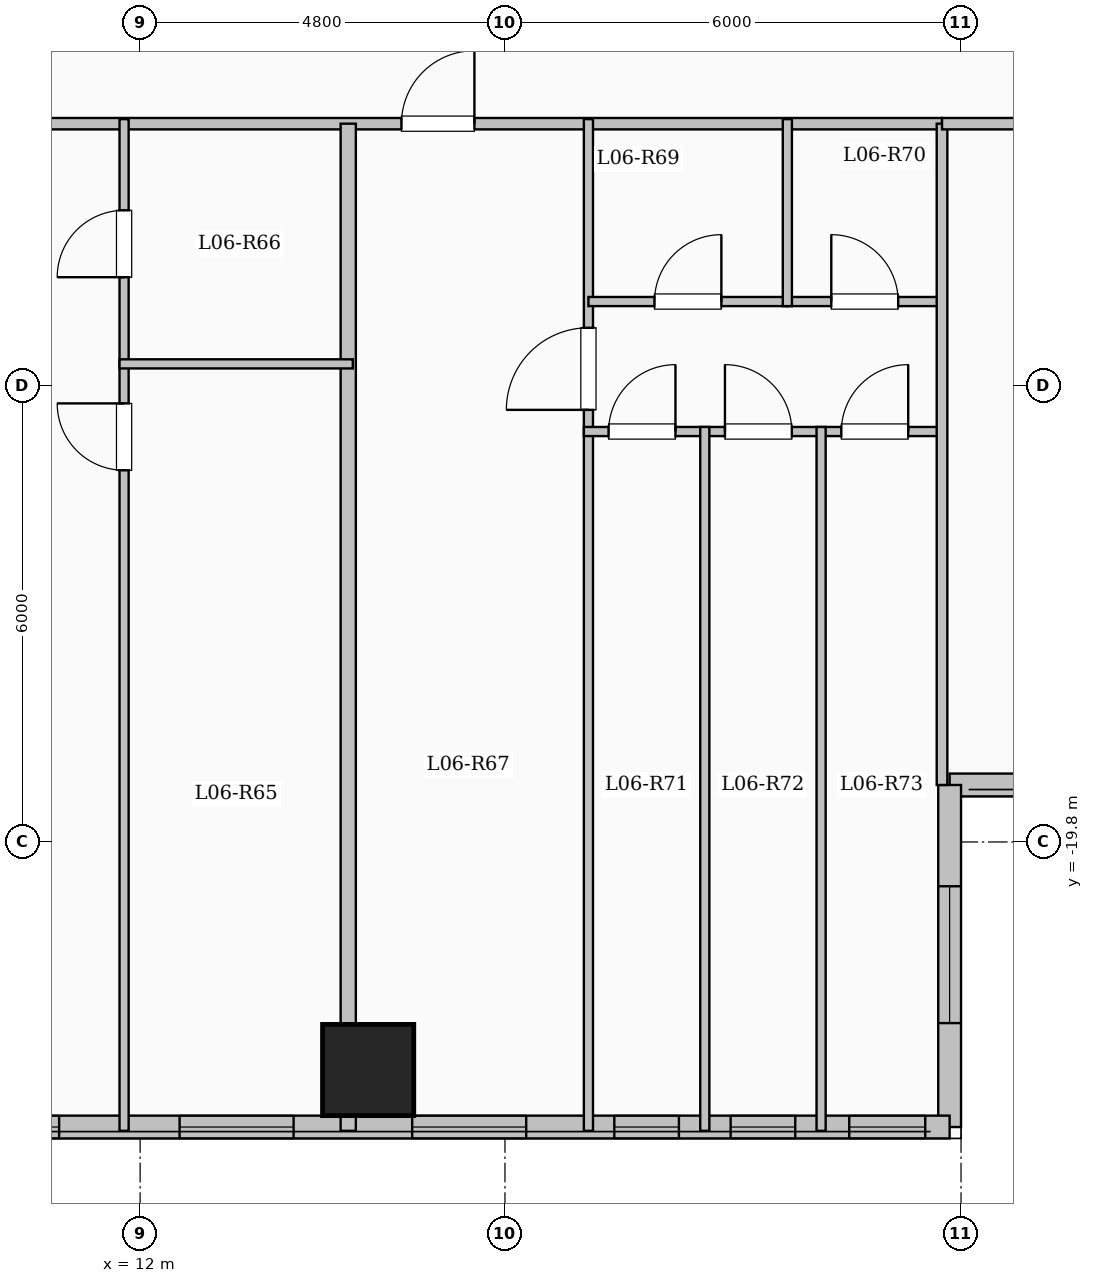
"""IFC4 building model, lengths in metres.
Left out: names, types, materials, properties, quantities, classifications, styles, units other than length and angle.
Written with IfcOpenShell. Run it as: python <this file> out.ifc"""

import sys

from ifc_helpers import new_model, si_unit, direction, frame, frame_2d, origin, origin_2d, place, context, subcontext, project, spatial, rectangle, extrude, element, fill, save


model = new_model("IFC4")
c1 = context("Model", 3, precision=1e-05, world=origin(), true_north=direction((0.0, 1.0)))
c2 = subcontext(c1, "Body", "Model", "MODEL_VIEW")
j1 = project(units=[si_unit("LENGTHUNIT", "METRE"), si_unit("PLANEANGLEUNIT", "RADIAN")], contexts=[c1])
p1 = place(None, origin())
s1 = spatial("IfcSite", under=j1, at=p1, CompositionType="ELEMENT")
p2 = place(p1, origin())
s2 = spatial("IfcBuilding", under=s1, at=p2, CompositionType="ELEMENT")
p3 = place(p2, frame((0.0, 0.0, 27.35)))
s3 = spatial("IfcBuildingStorey", under=s2, at=p3, CompositionType="ELEMENT", Elevation=27.35)
p4 = place(p3, frame((15.0, -22.8, 0.0), z_axis=(0.0, 0.0, 1.0), x_axis=(1.0, 0.0, 0.0)))
e1 = element("IfcColumn", 1, at=p4, inside=s3, PredefinedType="COLUMN", context=c2, shape_type="SweptSolid", body=[
    extrude(rectangle(XDim=1.2, YDim=1.2, at=origin_2d()), origin(), (0.0, 0.0, 1.0), 3.35),
])
p5 = place(p3, frame((28.65, -19.05, 0.0), z_axis=(0.0, 0.0, 1.0), x_axis=(-1.0, 0.0, 0.0)))
e2 = element("IfcWall", 2, at=p5, inside=s3, PredefinedType="SOLIDWALL", context=c2, shape_type="SweptSolid", body=[
    extrude(rectangle(XDim=6.0, YDim=0.3, at=frame_2d((3.0, 0.0))), origin(), (0.0, 0.0, 1.0), 3.1),
])
p6 = place(p5, frame((1.825, 0.0, 0.9)))
e3 = element("IfcOpeningElement", 3, at=p6, cuts=e2, PredefinedType="OPENING", context=c2, shape_type="SweptSolid", body=[
    extrude(rectangle(XDim=2.4, YDim=1.8, at=frame_2d((1.2, 0.9))), frame((0.0, 0.16, 0.0), z_axis=(0.0, -1.0, 0.0), x_axis=(1.0, 0.0, 0.0)), (0.0, 0.0, 1.0), 0.32),
])
p7 = place(p3, frame((22.65, -19.05, 0.0), z_axis=(0.0, 0.0, 1.0), x_axis=(0.0, -1.0, 0.0)))
e4 = element("IfcWall", 4, at=p7, inside=s3, PredefinedType="SOLIDWALL", context=c2, shape_type="SweptSolid", body=[
    extrude(rectangle(XDim=4.5, YDim=0.3, at=frame_2d((2.25, 0.0))), origin(), (0.0, 0.0, 1.0), 3.1),
])
p8 = place(p7, frame((1.333, 0.0, 0.9)))
e5 = element("IfcOpeningElement", 5, at=p8, cuts=e4, PredefinedType="OPENING", context=c2, shape_type="SweptSolid", body=[
    extrude(rectangle(XDim=1.8, YDim=1.65, at=frame_2d((0.9, 0.825))), frame((0.0, 0.16, 0.0), z_axis=(0.0, -1.0, 0.0), x_axis=(1.0, 0.0, 0.0)), (0.0, 0.0, 1.0), 0.32),
])
p9 = place(p3, frame((22.65, -23.55, 0.0), z_axis=(0.0, 0.0, 1.0), x_axis=(-1.0, 0.0, 0.0)))
e6 = element("IfcWall", 6, at=p9, inside=s3, PredefinedType="SOLIDWALL", context=c2, shape_type="SweptSolid", body=[
    extrude(rectangle(XDim=15.3, YDim=0.3, at=frame_2d((7.65, 0.0))), origin(), (0.0, 0.0, 1.0), 3.1),
])
p10 = place(p9, frame((0.321, 0.0, 0.95)))
e7 = element("IfcOpeningElement", 7, at=p10, cuts=e6, PredefinedType="OPENING", context=c2, shape_type="SweptSolid", body=[
    extrude(rectangle(XDim=1.0, YDim=1.5, at=frame_2d((0.5, 0.75))), frame((0.0, 0.16, 0.0), z_axis=(0.0, -1.0, 0.0), x_axis=(1.0, 0.0, 0.0)), (0.0, 0.0, 1.0), 0.32),
])
p11 = place(p9, frame((2.031, 0.0, 0.95)))
e8 = element("IfcOpeningElement", 8, at=p11, cuts=e6, PredefinedType="OPENING", context=c2, shape_type="SweptSolid", body=[
    extrude(rectangle(XDim=0.85, YDim=1.5, at=frame_2d((0.425, 0.75))), frame((0.0, 0.16, 0.0), z_axis=(0.0, -1.0, 0.0), x_axis=(1.0, 0.0, 0.0)), (0.0, 0.0, 1.0), 0.32),
])
p12 = place(p9, frame((3.562, 0.0, 0.95)))
e9 = element("IfcOpeningElement", 9, at=p12, cuts=e6, PredefinedType="OPENING", context=c2, shape_type="SweptSolid", body=[
    extrude(rectangle(XDim=0.85, YDim=1.5, at=frame_2d((0.425, 0.75))), frame((0.0, 0.16, 0.0), z_axis=(0.0, -1.0, 0.0), x_axis=(1.0, 0.0, 0.0)), (0.0, 0.0, 1.0), 0.32),
])
p13 = place(p9, frame((5.571, 0.0, 0.9)))
e10 = element("IfcOpeningElement", 10, at=p13, cuts=e6, PredefinedType="OPENING", context=c2, shape_type="SweptSolid", body=[
    extrude(rectangle(XDim=1.5, YDim=1.65, at=frame_2d((0.75, 0.825))), frame((0.0, 0.16, 0.0), z_axis=(0.0, -1.0, 0.0), x_axis=(1.0, 0.0, 0.0)), (0.0, 0.0, 1.0), 0.32),
])
p14 = place(p9, frame((8.631, 0.0, 0.9)))
e11 = element("IfcOpeningElement", 11, at=p14, cuts=e6, PredefinedType="OPENING", context=c2, shape_type="SweptSolid", body=[
    extrude(rectangle(XDim=1.5, YDim=1.65, at=frame_2d((0.75, 0.825))), frame((0.0, 0.16, 0.0), z_axis=(0.0, -1.0, 0.0), x_axis=(1.0, 0.0, 0.0)), (0.0, 0.0, 1.0), 0.32),
])
p15 = place(p9, frame((11.716, 0.0, 0.9)))
e12 = element("IfcOpeningElement", 12, at=p15, cuts=e6, PredefinedType="OPENING", context=c2, shape_type="SweptSolid", body=[
    extrude(rectangle(XDim=1.5, YDim=1.65, at=frame_2d((0.75, 0.825))), frame((0.0, 0.16, 0.0), z_axis=(0.0, -1.0, 0.0), x_axis=(1.0, 0.0, 0.0)), (0.0, 0.0, 1.0), 0.32),
])
p16 = place(p9, frame((14.303, 0.0, 0.95)))
e13 = element("IfcOpeningElement", 13, at=p16, cuts=e6, PredefinedType="OPENING", context=c2, shape_type="SweptSolid", body=[
    extrude(rectangle(XDim=0.85, YDim=1.5, at=frame_2d((0.425, 0.75))), frame((0.0, 0.16, 0.0), z_axis=(0.0, -1.0, 0.0), x_axis=(1.0, 0.0, 0.0)), (0.0, 0.0, 1.0), 0.32),
])
p17 = place(p3, frame((8.55, -10.35, 0.0), z_axis=(0.0, 0.0, 1.0), x_axis=(1.0, 0.0, 0.0)))
e14 = element("IfcWall", 14, at=p17, inside=s3, PredefinedType="PARTITIONING", context=c2, shape_type="SweptSolid", body=[
    extrude(rectangle(XDim=14.0, YDim=0.15, at=frame_2d((7.0, 0.0))), origin(), (0.0, 0.0, 1.0), 3.1),
])
p18 = place(p17, frame((0.75, 0.0, 0.0)))
e15 = element("IfcOpeningElement", 15, at=p18, cuts=e14, PredefinedType="OPENING", context=c2, shape_type="SweptSolid", body=[
    extrude(rectangle(XDim=0.96, YDim=2.15, at=frame_2d((0.48, 1.075))), frame((0.0, 0.085, 0.0), z_axis=(0.0, -1.0, 0.0), x_axis=(1.0, 0.0, 0.0)), (0.0, 0.0, 1.0), 0.17),
])
p19 = place(p17, frame((6.888, 0.0, 0.0)))
e16 = element("IfcOpeningElement", 16, at=p19, cuts=e14, PredefinedType="OPENING", context=c2, shape_type="SweptSolid", body=[
    extrude(rectangle(XDim=0.96, YDim=2.15, at=frame_2d((0.48, 1.075))), frame((0.0, 0.085, 0.0), z_axis=(0.0, -1.0, 0.0), x_axis=(1.0, 0.0, 0.0)), (0.0, 0.0, 1.0), 0.17),
])
p20 = place(p3, frame((14.738, -23.6, 0.0), z_axis=(0.0, 0.0, 1.0), x_axis=(0.0, 1.0, 0.0)))
e17 = element("IfcWall", 17, at=p20, inside=s3, PredefinedType="SOLIDWALL", context=c2, shape_type="SweptSolid", body=[
    extrude(rectangle(XDim=13.25, YDim=0.2, at=frame_2d((6.625, 0.0))), origin(), (0.0, 0.0, 1.0), 2.435),
])
p21 = place(p3, frame((11.789, -23.6, 0.0), z_axis=(0.0, 0.0, 1.0), x_axis=(0.0, 1.0, 0.0)))
e18 = element("IfcWall", 18, at=p21, inside=s3, PredefinedType="PARTITIONING", context=c2, shape_type="SweptSolid", body=[
    extrude(rectangle(XDim=10.09, YDim=0.12, at=frame_2d((5.045, 0.0))), origin(), (0.0, 0.0, 1.0), 3.1),
])
p22 = place(p21, frame((8.69, 0.0, 0.0)))
e19 = element("IfcOpeningElement", 19, at=p22, cuts=e18, PredefinedType="OPENING", context=c2, shape_type="SweptSolid", body=[
    extrude(rectangle(XDim=0.88, YDim=2.1, at=frame_2d((0.44, 1.05))), frame((0.0, 0.07, 0.0), z_axis=(0.0, -1.0, 0.0), x_axis=(1.0, 0.0, 0.0)), (0.0, 0.0, 1.0), 0.14),
])
p23 = place(p3, frame((11.789, -13.51, 0.0), z_axis=(0.0, 0.0, 1.0), x_axis=(0.0, 1.0, 0.0)))
e20 = element("IfcWall", 20, at=p23, inside=s3, PredefinedType="PARTITIONING", context=c2, shape_type="SweptSolid", body=[
    extrude(rectangle(XDim=3.22, YDim=0.12, at=frame_2d((1.61, 0.0))), origin(), (0.0, 0.0, 1.0), 3.1),
])
p24 = place(p23, frame((1.14, 0.0, 0.0)))
e21 = element("IfcOpeningElement", 21, at=p24, cuts=e20, PredefinedType="OPENING", context=c2, shape_type="SweptSolid", body=[
    extrude(rectangle(XDim=0.88, YDim=2.1, at=frame_2d((0.44, 1.05))), frame((0.0, 0.07, 0.0), z_axis=(0.0, -1.0, 0.0), x_axis=(1.0, 0.0, 0.0)), (0.0, 0.0, 1.0), 0.14),
])
p25 = place(p3, frame((11.729, -13.51, 0.0), z_axis=(0.0, 0.0, 1.0), x_axis=(1.0, 0.0, 0.0)))
e22 = element("IfcWall", 22, at=p25, inside=s3, PredefinedType="PARTITIONING", context=c2, shape_type="SweptSolid", body=[
    extrude(rectangle(XDim=3.069, YDim=0.12, at=frame_2d((1.535, 0.0))), origin(), (0.0, 0.0, 1.0), 3.1),
])
p26 = place(p3, frame((17.898, -23.6, 0.0), z_axis=(0.0, 0.0, 1.0), x_axis=(0.0, 1.0, 0.0)))
e23 = element("IfcWall", 23, at=p26, inside=s3, PredefinedType="PARTITIONING", context=c2, shape_type="SweptSolid", body=[
    extrude(rectangle(XDim=13.31, YDim=0.12, at=frame_2d((6.655, 0.0))), origin(), (0.0, 0.0, 1.0), 3.1),
])
p27 = place(p26, frame((9.485, 0.0, 0.0)))
e24 = element("IfcOpeningElement", 24, at=p27, cuts=e23, PredefinedType="OPENING", context=c2, shape_type="SweptSolid", body=[
    extrude(rectangle(XDim=1.08, YDim=2.15, at=frame_2d((0.54, 1.075))), frame((0.0, 0.07, 0.0), z_axis=(0.0, -1.0, 0.0), x_axis=(1.0, 0.0, 0.0)), (0.0, 0.0, 1.0), 0.14),
])
p28 = place(p3, frame((17.898, -12.69, 0.0), z_axis=(0.0, 0.0, 1.0), x_axis=(1.0, 0.0, 0.0)))
e25 = element("IfcWall", 25, at=p28, inside=s3, PredefinedType="PARTITIONING", context=c2, shape_type="SweptSolid", body=[
    extrude(rectangle(XDim=2.617, YDim=0.12, at=frame_2d((1.309, 0.0))), origin(), (0.0, 0.0, 1.0), 3.1),
])
p29 = place(p28, frame((0.869, 0.0, 0.0)))
e26 = element("IfcOpeningElement", 26, at=p29, cuts=e25, PredefinedType="OPENING", context=c2, shape_type="SweptSolid", body=[
    extrude(rectangle(XDim=0.88, YDim=2.1, at=frame_2d((0.44, 1.05))), frame((0.0, 0.07, 0.0), z_axis=(0.0, -1.0, 0.0), x_axis=(1.0, 0.0, 0.0)), (0.0, 0.0, 1.0), 0.14),
])
p30 = place(p3, frame((20.515, -12.69, 0.0), z_axis=(0.0, 0.0, 1.0), x_axis=(1.0, 0.0, 0.0)))
e27 = element("IfcWall", 27, at=p30, inside=s3, PredefinedType="PARTITIONING", context=c2, shape_type="SweptSolid", body=[
    extrude(rectangle(XDim=2.035, YDim=0.12, at=frame_2d((1.018, 0.0))), origin(), (0.0, 0.0, 1.0), 3.1),
])
p31 = place(p30, frame((0.578, 0.0, 0.0)))
e28 = element("IfcOpeningElement", 28, at=p31, cuts=e27, PredefinedType="OPENING", context=c2, shape_type="SweptSolid", body=[
    extrude(rectangle(XDim=0.88, YDim=2.1, at=frame_2d((0.44, 1.05))), frame((0.0, 0.07, 0.0), z_axis=(0.0, -1.0, 0.0), x_axis=(1.0, 0.0, 0.0)), (0.0, 0.0, 1.0), 0.14),
])
p32 = place(p3, frame((17.838, -14.4, 0.0), z_axis=(0.0, 0.0, 1.0), x_axis=(1.0, 0.0, 0.0)))
e29 = element("IfcWall", 29, at=p32, inside=s3, PredefinedType="PARTITIONING", context=c2, shape_type="SweptSolid", body=[
    extrude(rectangle(XDim=4.772, YDim=0.12, at=frame_2d((2.386, 0.0))), origin(), (0.0, 0.0, 1.0), 3.1),
])
p33 = place(p32, frame((0.325, 0.0, 0.0)))
e30 = element("IfcOpeningElement", 30, at=p33, cuts=e29, PredefinedType="OPENING", context=c2, shape_type="SweptSolid", body=[
    extrude(rectangle(XDim=0.88, YDim=2.1, at=frame_2d((0.44, 1.05))), frame((0.0, 0.07, 0.0), z_axis=(0.0, -1.0, 0.0), x_axis=(1.0, 0.0, 0.0)), (0.0, 0.0, 1.0), 0.14),
])
p34 = place(p32, frame((1.856, 0.0, 0.0)))
e31 = element("IfcOpeningElement", 31, at=p34, cuts=e29, PredefinedType="OPENING", context=c2, shape_type="SweptSolid", body=[
    extrude(rectangle(XDim=0.88, YDim=2.1, at=frame_2d((0.44, 1.05))), frame((0.0, 0.07, 0.0), z_axis=(0.0, -1.0, 0.0), x_axis=(1.0, 0.0, 0.0)), (0.0, 0.0, 1.0), 0.14),
])
p35 = place(p32, frame((3.387, 0.0, 0.0)))
e32 = element("IfcOpeningElement", 32, at=p35, cuts=e29, PredefinedType="OPENING", context=c2, shape_type="SweptSolid", body=[
    extrude(rectangle(XDim=0.88, YDim=2.1, at=frame_2d((0.44, 1.05))), frame((0.0, 0.07, 0.0), z_axis=(0.0, -1.0, 0.0), x_axis=(1.0, 0.0, 0.0)), (0.0, 0.0, 1.0), 0.14),
])
p36 = place(p3, frame((20.515, -12.75, 0.0), z_axis=(0.0, 0.0, 1.0), x_axis=(0.0, 1.0, 0.0)))
e33 = element("IfcWall", 33, at=p36, inside=s3, PredefinedType="PARTITIONING", context=c2, shape_type="SweptSolid", body=[
    extrude(rectangle(XDim=2.46, YDim=0.12, at=frame_2d((1.23, 0.0))), origin(), (0.0, 0.0, 1.0), 3.1),
])
for number, where, z_axis, x_axis in (
    (34, (19.429, -23.6, 0.0), (0.0, 0.0, 1.0), (0.0, 1.0, 0.0)),
    (35, (20.959, -23.6, 0.0), (0.0, 0.0, 1.0), (0.0, 1.0, 0.0)),
):
    element("IfcWall", number, at=place(p3, frame(where, z_axis=z_axis, x_axis=x_axis)), inside=s3, PredefinedType="PARTITIONING", context=c2, shape_type="SweptSolid", body=[
        extrude(rectangle(XDim=9.26, YDim=0.12, at=frame_2d((4.63, 0.0))), origin(), (0.0, 0.0, 1.0), 3.1),
    ])
p37 = place(p3, frame((22.55, -19.05, 0.0), z_axis=(0.0, 0.0, 1.0), x_axis=(0.0, 1.0, 0.0)))
e36 = element("IfcWall", 36, at=p37, inside=s3, PredefinedType="PARTITIONING", context=c2, shape_type="SweptSolid", body=[
    extrude(rectangle(XDim=8.7, YDim=0.14, at=frame_2d((4.35, 0.0))), origin(), (0.0, 0.0, 1.0), 3.1),
])
p38 = place(p3, frame((22.55, -10.35, 0.0), z_axis=(0.0, 0.0, 1.0), x_axis=(1.0, 0.0, 0.0)))
e37 = element("IfcWall", 37, at=p38, inside=s3, PredefinedType="PARTITIONING", context=c2, shape_type="SweptSolid", body=[
    extrude(rectangle(XDim=6.13, YDim=0.15, at=frame_2d((3.065, 0.0))), origin(), (0.0, 0.0, 1.0), 3.1),
])
p39 = place(p38, frame((2.59, 0.0, 0.0)))
e38 = element("IfcOpeningElement", 38, at=p39, cuts=e37, PredefinedType="OPENING", context=c2, shape_type="SweptSolid", body=[
    extrude(rectangle(XDim=0.95, YDim=2.15, at=frame_2d((0.475, 1.075))), frame((0.0, 0.085, 0.0), z_axis=(0.0, -1.0, 0.0), x_axis=(1.0, 0.0, 0.0)), (0.0, 0.0, 1.0), 0.17),
])
p40 = place(p8, origin())
e39 = element("IfcWindow", 39, at=p40, inside=s3, PartitioningType="SINGLE_PANEL", PredefinedType="WINDOW", context=c2, shape_type="SweptSolid", body=[
    extrude(rectangle(XDim=1.8, YDim=1.65, at=frame_2d((0.9, 0.825))), frame((0.0, 0.03, 0.0), z_axis=(0.0, -1.0, 0.0), x_axis=(1.0, 0.0, 0.0)), (0.0, 0.0, 1.0), 0.06),
])
fill(e5, e39)
p41 = place(p10, origin())
e40 = element("IfcWindow", 40, at=p41, inside=s3, PartitioningType="SINGLE_PANEL", PredefinedType="WINDOW", context=c2, shape_type="SweptSolid", body=[
    extrude(rectangle(XDim=1.0, YDim=1.5, at=frame_2d((0.5, 0.75))), frame((0.0, 0.03, 0.0), z_axis=(0.0, -1.0, 0.0), x_axis=(1.0, 0.0, 0.0)), (0.0, 0.0, 1.0), 0.06),
])
fill(e7, e40)
p42 = place(p11, origin())
e41 = element("IfcWindow", 41, at=p42, inside=s3, PartitioningType="SINGLE_PANEL", PredefinedType="WINDOW", context=c2, shape_type="SweptSolid", body=[
    extrude(rectangle(XDim=0.85, YDim=1.5, at=frame_2d((0.425, 0.75))), frame((0.0, 0.03, 0.0), z_axis=(0.0, -1.0, 0.0), x_axis=(1.0, 0.0, 0.0)), (0.0, 0.0, 1.0), 0.06),
])
fill(e8, e41)
p43 = place(p12, origin())
e42 = element("IfcWindow", 42, at=p43, inside=s3, PartitioningType="SINGLE_PANEL", PredefinedType="WINDOW", context=c2, shape_type="SweptSolid", body=[
    extrude(rectangle(XDim=0.85, YDim=1.5, at=frame_2d((0.425, 0.75))), frame((0.0, 0.03, 0.0), z_axis=(0.0, -1.0, 0.0), x_axis=(1.0, 0.0, 0.0)), (0.0, 0.0, 1.0), 0.06),
])
fill(e9, e42)
p44 = place(p13, origin())
e43 = element("IfcWindow", 43, at=p44, inside=s3, PartitioningType="SINGLE_PANEL", PredefinedType="WINDOW", context=c2, shape_type="SweptSolid", body=[
    extrude(rectangle(XDim=1.5, YDim=1.65, at=frame_2d((0.75, 0.825))), frame((0.0, 0.03, 0.0), z_axis=(0.0, -1.0, 0.0), x_axis=(1.0, 0.0, 0.0)), (0.0, 0.0, 1.0), 0.06),
])
fill(e10, e43)
p45 = place(p14, origin())
e44 = element("IfcWindow", 44, at=p45, inside=s3, PartitioningType="SINGLE_PANEL", PredefinedType="WINDOW", context=c2, shape_type="SweptSolid", body=[
    extrude(rectangle(XDim=1.5, YDim=1.65, at=frame_2d((0.75, 0.825))), frame((0.0, 0.03, 0.0), z_axis=(0.0, -1.0, 0.0), x_axis=(1.0, 0.0, 0.0)), (0.0, 0.0, 1.0), 0.06),
])
fill(e11, e44)
p46 = place(p15, origin())
e45 = element("IfcWindow", 45, at=p46, inside=s3, PartitioningType="SINGLE_PANEL", PredefinedType="WINDOW", context=c2, shape_type="SweptSolid", body=[
    extrude(rectangle(XDim=1.5, YDim=1.65, at=frame_2d((0.75, 0.825))), frame((0.0, 0.03, 0.0), z_axis=(0.0, -1.0, 0.0), x_axis=(1.0, 0.0, 0.0)), (0.0, 0.0, 1.0), 0.06),
])
fill(e12, e45)
p47 = place(p22, origin())
e46 = element("IfcDoor", 46, at=p47, inside=s3, OperationType="SINGLE_SWING_RIGHT", PredefinedType="DOOR", context=c2, shape_type="SweptSolid", body=[
    extrude(rectangle(XDim=0.88, YDim=2.1, at=frame_2d((0.44, 1.05))), frame((0.0, 0.025, 0.0), z_axis=(0.0, -1.0, 0.0), x_axis=(1.0, 0.0, 0.0)), (0.0, 0.0, 1.0), 0.05),
])
fill(e19, e46)
p48 = place(p24, origin())
e47 = element("IfcDoor", 47, at=p48, inside=s3, OperationType="SINGLE_SWING_LEFT", PredefinedType="DOOR", context=c2, shape_type="SweptSolid", body=[
    extrude(rectangle(XDim=0.88, YDim=2.1, at=frame_2d((0.44, 1.05))), frame((0.0, 0.025, 0.0), z_axis=(0.0, -1.0, 0.0), x_axis=(1.0, 0.0, 0.0)), (0.0, 0.0, 1.0), 0.05),
])
fill(e21, e47)
p49 = place(p19, origin())
e48 = element("IfcDoor", 48, at=p49, inside=s3, OperationType="SINGLE_SWING_RIGHT", PredefinedType="DOOR", context=c2, shape_type="SweptSolid", body=[
    extrude(rectangle(XDim=0.96, YDim=2.15, at=frame_2d((0.48, 1.075))), frame((0.0, 0.025, 0.0), z_axis=(0.0, -1.0, 0.0), x_axis=(1.0, 0.0, 0.0)), (0.0, 0.0, 1.0), 0.05),
])
fill(e16, e48)
p50 = place(p27, origin())
e49 = element("IfcDoor", 49, at=p50, inside=s3, OperationType="SINGLE_SWING_LEFT", PredefinedType="DOOR", context=c2, shape_type="SweptSolid", body=[
    extrude(rectangle(XDim=1.08, YDim=2.15, at=frame_2d((0.54, 1.075))), frame((0.0, 0.025, 0.0), z_axis=(0.0, -1.0, 0.0), x_axis=(1.0, 0.0, 0.0)), (0.0, 0.0, 1.0), 0.05),
])
fill(e24, e49)
p51 = place(p29, origin())
e50 = element("IfcDoor", 50, at=p51, inside=s3, OperationType="SINGLE_SWING_RIGHT", PredefinedType="DOOR", context=c2, shape_type="SweptSolid", body=[
    extrude(rectangle(XDim=0.88, YDim=2.1, at=frame_2d((0.44, 1.05))), frame((0.0, 0.025, 0.0), z_axis=(0.0, -1.0, 0.0), x_axis=(1.0, 0.0, 0.0)), (0.0, 0.0, 1.0), 0.05),
])
fill(e26, e50)
p52 = place(p31, origin())
e51 = element("IfcDoor", 51, at=p52, inside=s3, OperationType="SINGLE_SWING_LEFT", PredefinedType="DOOR", context=c2, shape_type="SweptSolid", body=[
    extrude(rectangle(XDim=0.88, YDim=2.1, at=frame_2d((0.44, 1.05))), frame((0.0, 0.025, 0.0), z_axis=(0.0, -1.0, 0.0), x_axis=(1.0, 0.0, 0.0)), (0.0, 0.0, 1.0), 0.05),
])
fill(e28, e51)
p53 = place(p33, origin())
e52 = element("IfcDoor", 52, at=p53, inside=s3, OperationType="SINGLE_SWING_RIGHT", PredefinedType="DOOR", context=c2, shape_type="SweptSolid", body=[
    extrude(rectangle(XDim=0.88, YDim=2.1, at=frame_2d((0.44, 1.05))), frame((0.0, 0.025, 0.0), z_axis=(0.0, -1.0, 0.0), x_axis=(1.0, 0.0, 0.0)), (0.0, 0.0, 1.0), 0.05),
])
fill(e30, e52)
p54 = place(p34, origin())
e53 = element("IfcDoor", 53, at=p54, inside=s3, OperationType="SINGLE_SWING_LEFT", PredefinedType="DOOR", context=c2, shape_type="SweptSolid", body=[
    extrude(rectangle(XDim=0.88, YDim=2.1, at=frame_2d((0.44, 1.05))), frame((0.0, 0.025, 0.0), z_axis=(0.0, -1.0, 0.0), x_axis=(1.0, 0.0, 0.0)), (0.0, 0.0, 1.0), 0.05),
])
fill(e31, e53)
p55 = place(p35, origin())
e54 = element("IfcDoor", 54, at=p55, inside=s3, OperationType="SINGLE_SWING_RIGHT", PredefinedType="DOOR", context=c2, shape_type="SweptSolid", body=[
    extrude(rectangle(XDim=0.88, YDim=2.1, at=frame_2d((0.44, 1.05))), frame((0.0, 0.025, 0.0), z_axis=(0.0, -1.0, 0.0), x_axis=(1.0, 0.0, 0.0)), (0.0, 0.0, 1.0), 0.05),
])
fill(e32, e54)
save(model, sys.argv[1])
